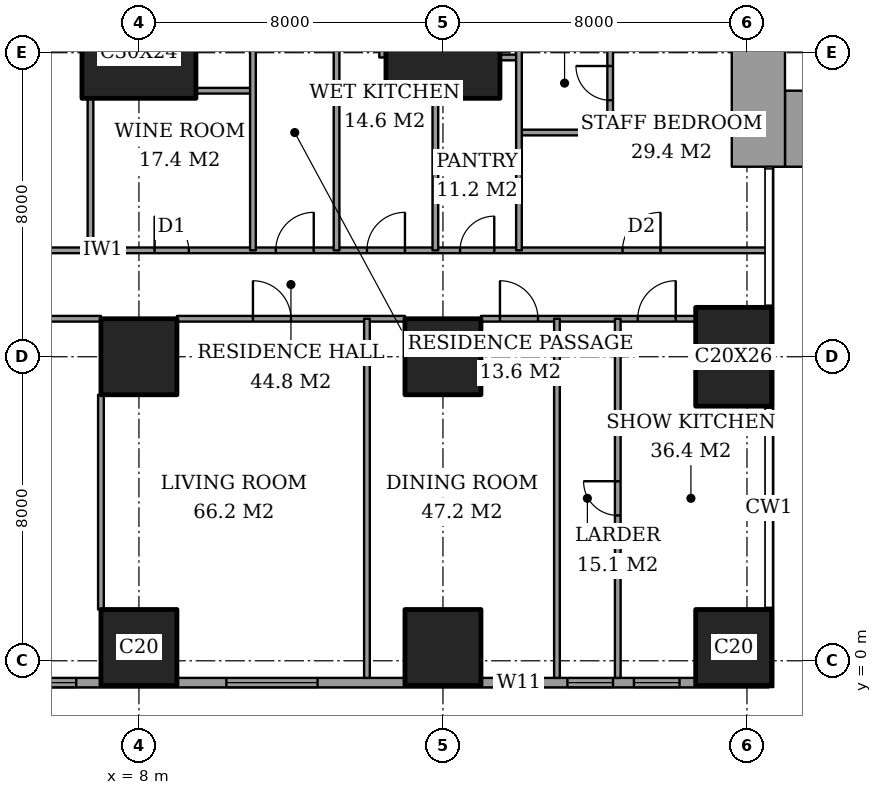
"""IFC4 building model, lengths in metres.
Left out: names, types, materials, properties, quantities, classifications, styles, units other than length and angle.
Written with IfcOpenShell. Run it as: python <this file> out.ifc"""

import sys

from ifc_helpers import new_model, si_unit, direction, frame, frame_2d, origin, origin_2d, place, context, subcontext, project, spatial, rectangle, extrude, element, fill, save


model = new_model("IFC4")
c1 = context("Model", 3, precision=1e-05, world=origin(), true_north=direction((0.0, 1.0)))
c2 = subcontext(c1, "Body", "Model", "MODEL_VIEW")
j1 = project(units=[si_unit("LENGTHUNIT", "METRE"), si_unit("PLANEANGLEUNIT", "RADIAN")], contexts=[c1])
p1 = place(None, origin())
s1 = spatial("IfcSite", under=j1, at=p1, CompositionType="ELEMENT")
p2 = place(p1, origin())
s2 = spatial("IfcBuilding", under=s1, at=p2, CompositionType="ELEMENT")
p3 = place(p2, frame((0.0, 0.0, 96.2)))
s3 = spatial("IfcBuildingStorey", under=s2, at=p3, CompositionType="ELEMENT", Elevation=96.2)
for number, where, z_axis, x_axis in (
    (1, (8.0, 0.35, 0.0), (0.0, 0.0, 1.0), (1.0, 0.0, 0.0)),
    (2, (8.0, 8.0, 0.0), (0.0, 0.0, 1.0), (1.0, 0.0, 0.0)),
):
    element("IfcColumn", number, at=place(p3, frame(where, z_axis=z_axis, x_axis=x_axis)), inside=s3, PredefinedType="COLUMN", context=c2, shape_type="SweptSolid", body=[
        extrude(rectangle(XDim=2.0, YDim=2.0, at=origin_2d()), origin(), (0.0, 0.0, 1.0), 3.6),
    ])
p4 = place(p3, frame((8.0, 16.0, 0.0), z_axis=(0.0, 0.0, 1.0), x_axis=(1.0, 0.0, 0.0)))
e3 = element("IfcColumn", 3, at=p4, inside=s3, PredefinedType="COLUMN", context=c2, shape_type="SweptSolid", body=[
    extrude(rectangle(XDim=3.0, YDim=2.4, at=origin_2d()), origin(), (0.0, 0.0, 1.0), 3.6),
])
for number, where, z_axis, x_axis in (
    (4, (16.0, 0.35, 0.0), (0.0, 0.0, 1.0), (1.0, 0.0, 0.0)),
    (5, (16.0, 8.0, 0.0), (0.0, 0.0, 1.0), (1.0, 0.0, 0.0)),
):
    element("IfcColumn", number, at=place(p3, frame(where, z_axis=z_axis, x_axis=x_axis)), inside=s3, PredefinedType="COLUMN", context=c2, shape_type="SweptSolid", body=[
        extrude(rectangle(XDim=2.0, YDim=2.0, at=origin_2d()), origin(), (0.0, 0.0, 1.0), 3.6),
    ])
p5 = place(p3, frame((16.0, 16.0, 0.0), z_axis=(0.0, 0.0, 1.0), x_axis=(1.0, 0.0, 0.0)))
e6 = element("IfcColumn", 6, at=p5, inside=s3, PredefinedType="COLUMN", context=c2, shape_type="SweptSolid", body=[
    extrude(rectangle(XDim=3.0, YDim=2.4, at=origin_2d()), origin(), (0.0, 0.0, 1.0), 3.6),
])
p6 = place(p3, frame((23.65, 0.35, 0.0), z_axis=(0.0, 0.0, 1.0), x_axis=(1.0, 0.0, 0.0)))
e7 = element("IfcColumn", 7, at=p6, inside=s3, PredefinedType="COLUMN", context=c2, shape_type="SweptSolid", body=[
    extrude(rectangle(XDim=2.0, YDim=2.0, at=origin_2d()), origin(), (0.0, 0.0, 1.0), 3.6),
])
p7 = place(p3, frame((23.65, 8.0, 0.0), z_axis=(0.0, 0.0, 1.0), x_axis=(1.0, 0.0, 0.0)))
e8 = element("IfcColumn", 8, at=p7, inside=s3, PredefinedType="COLUMN", context=c2, shape_type="SweptSolid", body=[
    extrude(rectangle(XDim=2.0, YDim=2.6, at=origin_2d()), origin(), (0.0, 0.0, 1.0), 3.6),
])
p8 = place(p3, frame((25.0, 14.0, 0.0), z_axis=(0.0, 0.0, 1.0), x_axis=(1.0, 0.0, 0.0)))
e9 = element("IfcWall", 9, at=p8, inside=s3, PredefinedType="SHEAR", context=c2, shape_type="SweptSolid", body=[
    extrude(rectangle(XDim=3.15, YDim=2.0, at=frame_2d((1.575, 0.0))), origin(), (0.0, 0.0, 1.0), 3.6),
])
p9 = place(p3, frame((24.3, 13.0, 0.0), z_axis=(0.0, 0.0, 1.0), x_axis=(0.0, 1.0, 0.0)))
e10 = element("IfcWall", 10, at=p9, inside=s3, PredefinedType="SHEAR", context=c2, shape_type="SweptSolid", body=[
    extrude(rectangle(XDim=10.15, YDim=1.4, at=frame_2d((5.075, 0.0))), origin(), (0.0, 0.0, 1.0), 3.6),
])
p10 = place(p3, frame((3.175, -0.575, 0.0), z_axis=(0.0, 0.0, 1.0), x_axis=(1.0, 0.0, 0.0)))
e11 = element("IfcWall", 11, at=p10, inside=s3, PredefinedType="SOLIDWALL", context=c2, shape_type="SweptSolid", body=[
    extrude(rectangle(XDim=21.4, YDim=0.25, at=frame_2d((10.7, 0.0))), origin(), (0.0, 0.0, 1.0), 3.6),
])
p11 = place(p10, frame((0.775, 0.0, 0.4)))
e12 = element("IfcOpeningElement", 12, at=p11, cuts=e11, PredefinedType="OPENING", context=c2, shape_type="SweptSolid", body=[
    extrude(rectangle(XDim=2.4, YDim=2.2, at=frame_2d((1.2, 1.1))), frame((0.0, 0.135, 0.0), z_axis=(0.0, -1.0, 0.0), x_axis=(1.0, 0.0, 0.0)), (0.0, 0.0, 1.0), 0.27),
])
p12 = place(p10, frame((7.125, 0.0, 0.4)))
e13 = element("IfcOpeningElement", 13, at=p12, cuts=e11, PredefinedType="OPENING", context=c2, shape_type="SweptSolid", body=[
    extrude(rectangle(XDim=2.4, YDim=2.2, at=frame_2d((1.2, 1.1))), frame((0.0, 0.135, 0.0), z_axis=(0.0, -1.0, 0.0), x_axis=(1.0, 0.0, 0.0)), (0.0, 0.0, 1.0), 0.27),
])
p13 = place(p10, frame((14.225, 0.0, 0.4)))
e14 = element("IfcOpeningElement", 14, at=p13, cuts=e11, PredefinedType="OPENING", context=c2, shape_type="SweptSolid", body=[
    extrude(rectangle(XDim=1.2, YDim=2.2, at=frame_2d((0.6, 1.1))), frame((0.0, 0.135, 0.0), z_axis=(0.0, -1.0, 0.0), x_axis=(1.0, 0.0, 0.0)), (0.0, 0.0, 1.0), 0.27),
])
p14 = place(p10, frame((16.1, 0.0, 0.4)))
e15 = element("IfcOpeningElement", 15, at=p14, cuts=e11, PredefinedType="OPENING", context=c2, shape_type="SweptSolid", body=[
    extrude(rectangle(XDim=1.2, YDim=2.2, at=frame_2d((0.6, 1.1))), frame((0.0, 0.135, 0.0), z_axis=(0.0, -1.0, 0.0), x_axis=(1.0, 0.0, 0.0)), (0.0, 0.0, 1.0), 0.27),
])
p15 = place(p10, frame((17.85, 0.0, 0.4)))
e16 = element("IfcOpeningElement", 16, at=p15, cuts=e11, PredefinedType="OPENING", context=c2, shape_type="SweptSolid", body=[
    extrude(rectangle(XDim=1.2, YDim=2.2, at=frame_2d((0.6, 1.1))), frame((0.0, 0.135, 0.0), z_axis=(0.0, -1.0, 0.0), x_axis=(1.0, 0.0, 0.0)), (0.0, 0.0, 1.0), 0.27),
])
p16 = place(p3, frame((1.35, 9.0, 0.0), z_axis=(0.0, 0.0, 1.0), x_axis=(1.0, 0.0, 0.0)))
e17 = element("IfcWall", 17, at=p16, inside=s3, PredefinedType="PARTITIONING", context=c2, shape_type="SweptSolid", body=[
    extrude(rectangle(XDim=5.65, YDim=0.15, at=frame_2d((2.825, 0.0))), origin(), (0.0, 0.0, 1.0), 3.35),
])
p17 = place(p16, frame((2.325, 0.0, 0.0)))
e18 = element("IfcOpeningElement", 18, at=p17, cuts=e17, PredefinedType="OPENING", context=c2, shape_type="SweptSolid", body=[
    extrude(rectangle(XDim=1.0, YDim=2.1, at=frame_2d((0.5, 1.05))), frame((0.0, 0.085, 0.0), z_axis=(0.0, -1.0, 0.0), x_axis=(1.0, 0.0, 0.0)), (0.0, 0.0, 1.0), 0.17),
])
p18 = place(p3, frame((9.0, 9.0, 0.0), z_axis=(0.0, 0.0, 1.0), x_axis=(1.0, 0.0, 0.0)))
e19 = element("IfcWall", 19, at=p18, inside=s3, PredefinedType="PARTITIONING", context=c2, shape_type="SweptSolid", body=[
    extrude(rectangle(XDim=6.0, YDim=0.15, at=frame_2d((3.0, 0.0))), origin(), (0.0, 0.0, 1.0), 3.35),
])
p19 = place(p18, frame((2.0, 0.0, 0.0)))
e20 = element("IfcOpeningElement", 20, at=p19, cuts=e19, PredefinedType="OPENING", context=c2, shape_type="SweptSolid", body=[
    extrude(rectangle(XDim=1.0, YDim=2.1, at=frame_2d((0.5, 1.05))), frame((0.0, 0.085, 0.0), z_axis=(0.0, -1.0, 0.0), x_axis=(1.0, 0.0, 0.0)), (0.0, 0.0, 1.0), 0.17),
])
p20 = place(p3, frame((17.0, 9.0, 0.0), z_axis=(0.0, 0.0, 1.0), x_axis=(1.0, 0.0, 0.0)))
e21 = element("IfcWall", 21, at=p20, inside=s3, PredefinedType="PARTITIONING", context=c2, shape_type="SweptSolid", body=[
    extrude(rectangle(XDim=5.65, YDim=0.15, at=frame_2d((2.825, 0.0))), origin(), (0.0, 0.0, 1.0), 3.35),
])
p21 = place(p20, frame((0.5, 0.0, 0.0)))
e22 = element("IfcOpeningElement", 22, at=p21, cuts=e21, PredefinedType="OPENING", context=c2, shape_type="SweptSolid", body=[
    extrude(rectangle(XDim=1.0, YDim=2.1, at=frame_2d((0.5, 1.05))), frame((0.0, 0.085, 0.0), z_axis=(0.0, -1.0, 0.0), x_axis=(1.0, 0.0, 0.0)), (0.0, 0.0, 1.0), 0.17),
])
p22 = place(p20, frame((4.125, 0.0, 0.0)))
e23 = element("IfcOpeningElement", 23, at=p22, cuts=e21, PredefinedType="OPENING", context=c2, shape_type="SweptSolid", body=[
    extrude(rectangle(XDim=1.0, YDim=2.1, at=frame_2d((0.5, 1.05))), frame((0.0, 0.085, 0.0), z_axis=(0.0, -1.0, 0.0), x_axis=(1.0, 0.0, 0.0)), (0.0, 0.0, 1.0), 0.17),
])
p23 = place(p3, frame((-0.45, 10.8, 0.0), z_axis=(0.0, 0.0, 1.0), x_axis=(1.0, 0.0, 0.0)))
e24 = element("IfcWall", 24, at=p23, inside=s3, PredefinedType="PARTITIONING", context=c2, shape_type="SweptSolid", body=[
    extrude(rectangle(XDim=25.011, YDim=0.15, at=frame_2d((12.505, 0.0))), origin(), (0.0, 0.0, 1.0), 3.35),
])
p24 = place(p23, frame((12.05, 0.0, 0.0)))
e25 = element("IfcOpeningElement", 25, at=p24, cuts=e24, PredefinedType="OPENING", context=c2, shape_type="SweptSolid", body=[
    extrude(rectangle(XDim=1.0, YDim=2.1, at=frame_2d((0.5, 1.05))), frame((0.0, 0.085, 0.0), z_axis=(0.0, -1.0, 0.0), x_axis=(1.0, 0.0, 0.0)), (0.0, 0.0, 1.0), 0.17),
])
p25 = place(p23, frame((3.087, 0.0, 0.0)))
e26 = element("IfcOpeningElement", 26, at=p25, cuts=e24, PredefinedType="OPENING", context=c2, shape_type="SweptSolid", body=[
    extrude(rectangle(XDim=1.0, YDim=2.1, at=frame_2d((0.5, 1.05))), frame((0.0, 0.085, 0.0), z_axis=(0.0, -1.0, 0.0), x_axis=(1.0, 0.0, 0.0)), (0.0, 0.0, 1.0), 0.17),
])
p26 = place(p23, frame((8.863, 0.0, 0.0)))
e27 = element("IfcOpeningElement", 27, at=p26, cuts=e24, PredefinedType="OPENING", context=c2, shape_type="SweptSolid", body=[
    extrude(rectangle(XDim=0.9, YDim=2.1, at=frame_2d((0.45, 1.05))), frame((0.0, 0.085, 0.0), z_axis=(0.0, -1.0, 0.0), x_axis=(1.0, 0.0, 0.0)), (0.0, 0.0, 1.0), 0.17),
])
p27 = place(p23, frame((14.45, 0.0, 0.0)))
e28 = element("IfcOpeningElement", 28, at=p27, cuts=e24, PredefinedType="OPENING", context=c2, shape_type="SweptSolid", body=[
    extrude(rectangle(XDim=1.0, YDim=2.1, at=frame_2d((0.5, 1.05))), frame((0.0, 0.085, 0.0), z_axis=(0.0, -1.0, 0.0), x_axis=(1.0, 0.0, 0.0)), (0.0, 0.0, 1.0), 0.17),
])
p28 = place(p23, frame((16.9, 0.0, 0.0)))
e29 = element("IfcOpeningElement", 29, at=p28, cuts=e24, PredefinedType="OPENING", context=c2, shape_type="SweptSolid", body=[
    extrude(rectangle(XDim=0.9, YDim=2.1, at=frame_2d((0.45, 1.05))), frame((0.0, 0.085, 0.0), z_axis=(0.0, -1.0, 0.0), x_axis=(1.0, 0.0, 0.0)), (0.0, 0.0, 1.0), 0.17),
])
p29 = place(p23, frame((21.175, 0.0, 0.0)))
e30 = element("IfcOpeningElement", 30, at=p29, cuts=e24, PredefinedType="OPENING", context=c2, shape_type="SweptSolid", body=[
    extrude(rectangle(XDim=1.0, YDim=2.1, at=frame_2d((0.5, 1.05))), frame((0.0, 0.085, 0.0), z_axis=(0.0, -1.0, 0.0), x_axis=(1.0, 0.0, 0.0)), (0.0, 0.0, 1.0), 0.17),
])
p30 = place(p3, frame((18.0, 13.9, 0.0), z_axis=(0.0, 0.0, 1.0), x_axis=(1.0, 0.0, 0.0)))
e31 = element("IfcWall", 31, at=p30, inside=s3, PredefinedType="PARTITIONING", context=c2, shape_type="SweptSolid", body=[
    extrude(rectangle(XDim=2.4, YDim=0.15, at=frame_2d((1.2, 0.0))), origin(), (0.0, 0.0, 1.0), 3.35),
])
p31 = place(p3, frame((9.5, 15.0, 0.0), z_axis=(0.0, 0.0, 1.0), x_axis=(1.0, 0.0, 0.0)))
e32 = element("IfcWall", 32, at=p31, inside=s3, PredefinedType="PARTITIONING", context=c2, shape_type="SweptSolid", body=[
    extrude(rectangle(XDim=1.5, YDim=0.15, at=frame_2d((0.75, 0.0))), origin(), (0.0, 0.0, 1.0), 3.35),
])
p32 = place(p3, frame((17.5, 15.875, 0.0), z_axis=(0.0, 0.0, 1.0), x_axis=(1.0, 0.0, 0.0)))
e33 = element("IfcWall", 33, at=p32, inside=s3, PredefinedType="PARTITIONING", context=c2, shape_type="SweptSolid", body=[
    extrude(rectangle(XDim=0.5, YDim=0.15, at=frame_2d((0.25, 0.0))), origin(), (0.0, 0.0, 1.0), 2.634),
])
p33 = place(p3, frame((6.725, 10.8, 0.0), z_axis=(0.0, 0.0, 1.0), x_axis=(0.0, 1.0, 0.0)))
e34 = element("IfcWall", 34, at=p33, inside=s3, PredefinedType="PARTITIONING", context=c2, shape_type="SweptSolid", body=[
    extrude(rectangle(XDim=4.0, YDim=0.15, at=frame_2d((2.0, 0.0))), origin(), (0.0, 0.0, 1.0), 3.35),
])
p34 = place(p3, frame((7.0, 1.35, 0.0), z_axis=(0.0, 0.0, 1.0), x_axis=(0.0, 1.0, 0.0)))
e35 = element("IfcWall", 35, at=p34, inside=s3, PredefinedType="PARTITIONING", context=c2, shape_type="SweptSolid", body=[
    extrude(rectangle(XDim=5.65, YDim=0.15, at=frame_2d((2.825, 0.0))), origin(), (0.0, 0.0, 1.0), 3.35),
])
p35 = place(p3, frame((11.0, 10.8, 0.0), z_axis=(0.0, 0.0, 1.0), x_axis=(0.0, 1.0, 0.0)))
e36 = element("IfcWall", 36, at=p35, inside=s3, PredefinedType="PARTITIONING", context=c2, shape_type="SweptSolid", body=[
    extrude(rectangle(XDim=10.8, YDim=0.15, at=frame_2d((5.4, 0.0))), origin(), (0.0, 0.0, 1.0), 3.35),
])
p36 = place(p35, frame((8.0, 0.0, 0.0)))
e37 = element("IfcOpeningElement", 37, at=p36, cuts=e36, PredefinedType="OPENING", context=c2, shape_type="SweptSolid", body=[
    extrude(rectangle(XDim=1.0, YDim=2.1, at=frame_2d((0.5, 1.05))), frame((0.0, 0.085, 0.0), z_axis=(0.0, -1.0, 0.0), x_axis=(1.0, 0.0, 0.0)), (0.0, 0.0, 1.0), 0.17),
])
p37 = place(p3, frame((13.2, 10.8, 0.0), z_axis=(0.0, 0.0, 1.0), x_axis=(0.0, 1.0, 0.0)))
e38 = element("IfcWall", 38, at=p37, inside=s3, PredefinedType="PARTITIONING", context=c2, shape_type="SweptSolid", body=[
    extrude(rectangle(XDim=6.2, YDim=0.15, at=frame_2d((3.1, 0.0))), origin(), (0.0, 0.0, 1.0), 3.35),
])
p38 = place(p3, frame((14.0, -0.45, 0.0), z_axis=(0.0, 0.0, 1.0), x_axis=(0.0, 1.0, 0.0)))
e39 = element("IfcWall", 39, at=p38, inside=s3, PredefinedType="PARTITIONING", context=c2, shape_type="SweptSolid", body=[
    extrude(rectangle(XDim=9.45, YDim=0.15, at=frame_2d((4.725, 0.0))), origin(), (0.0, 0.0, 1.0), 3.35),
])
p39 = place(p3, frame((14.4, 15.875, 0.0), z_axis=(0.0, 0.0, 1.0), x_axis=(0.0, 1.0, 0.0)))
e40 = element("IfcWall", 40, at=p39, inside=s3, PredefinedType="PARTITIONING", context=c2, shape_type="SweptSolid", body=[
    extrude(rectangle(XDim=1.125, YDim=0.15, at=frame_2d((0.562, 0.0))), origin(), (0.0, 0.0, 1.0), 3.35),
])
p40 = place(p3, frame((15.8, 10.8, 0.0), z_axis=(0.0, 0.0, 1.0), x_axis=(0.0, 1.0, 0.0)))
e41 = element("IfcWall", 41, at=p40, inside=s3, PredefinedType="PARTITIONING", context=c2, shape_type="SweptSolid", body=[
    extrude(rectangle(XDim=4.0, YDim=0.15, at=frame_2d((2.0, 0.0))), origin(), (0.0, 0.0, 1.0), 3.35),
])
p41 = place(p3, frame((18.0, 10.8, 0.0), z_axis=(0.0, 0.0, 1.0), x_axis=(0.0, 1.0, 0.0)))
e42 = element("IfcWall", 42, at=p41, inside=s3, PredefinedType="PARTITIONING", context=c2, shape_type="SweptSolid", body=[
    extrude(rectangle(XDim=6.2, YDim=0.15, at=frame_2d((3.1, 0.0))), origin(), (0.0, 0.0, 1.0), 3.35),
])
p42 = place(p3, frame((19.0, -0.45, 0.0), z_axis=(0.0, 0.0, 1.0), x_axis=(0.0, 1.0, 0.0)))
e43 = element("IfcWall", 43, at=p42, inside=s3, PredefinedType="PARTITIONING", context=c2, shape_type="SweptSolid", body=[
    extrude(rectangle(XDim=9.45, YDim=0.15, at=frame_2d((4.725, 0.0))), origin(), (0.0, 0.0, 1.0), 3.35),
])
p43 = place(p3, frame((20.4, 13.9, 0.0), z_axis=(0.0, 0.0, 1.0), x_axis=(0.0, 1.0, 0.0)))
e44 = element("IfcWall", 44, at=p43, inside=s3, PredefinedType="PARTITIONING", context=c2, shape_type="SweptSolid", body=[
    extrude(rectangle(XDim=2.6, YDim=0.15, at=frame_2d((1.3, 0.0))), origin(), (0.0, 0.0, 1.0), 3.35),
])
p44 = place(p43, frame((0.85, 0.0, 0.0)))
e45 = element("IfcOpeningElement", 45, at=p44, cuts=e44, PredefinedType="OPENING", context=c2, shape_type="SweptSolid", body=[
    extrude(rectangle(XDim=0.9, YDim=2.1, at=frame_2d((0.45, 1.05))), frame((0.0, 0.085, 0.0), z_axis=(0.0, -1.0, 0.0), x_axis=(1.0, 0.0, 0.0)), (0.0, 0.0, 1.0), 0.17),
])
p45 = place(p3, frame((20.6, -0.45, 0.0), z_axis=(0.0, 0.0, 1.0), x_axis=(0.0, 1.0, 0.0)))
e46 = element("IfcWall", 46, at=p45, inside=s3, PredefinedType="PARTITIONING", context=c2, shape_type="SweptSolid", body=[
    extrude(rectangle(XDim=9.45, YDim=0.15, at=frame_2d((4.725, 0.0))), origin(), (0.0, 0.0, 1.0), 3.35),
])
p46 = place(p45, frame((4.275, 0.0, 0.0)))
e47 = element("IfcOpeningElement", 47, at=p46, cuts=e46, PredefinedType="OPENING", context=c2, shape_type="SweptSolid", body=[
    extrude(rectangle(XDim=0.9, YDim=2.1, at=frame_2d((0.45, 1.05))), frame((0.0, 0.085, 0.0), z_axis=(0.0, -1.0, 0.0), x_axis=(1.0, 0.0, 0.0)), (0.0, 0.0, 1.0), 0.17),
])
p47 = place(p11, origin())
e48 = element("IfcWindow", 48, at=p47, inside=s3, PartitioningType="SINGLE_PANEL", PredefinedType="WINDOW", context=c2, shape_type="SweptSolid", body=[
    extrude(rectangle(XDim=2.4, YDim=2.2, at=frame_2d((1.2, 1.1))), frame((0.0, 0.03, 0.0), z_axis=(0.0, -1.0, 0.0), x_axis=(1.0, 0.0, 0.0)), (0.0, 0.0, 1.0), 0.06),
])
fill(e12, e48)
p48 = place(p12, origin())
e49 = element("IfcWindow", 49, at=p48, inside=s3, PartitioningType="SINGLE_PANEL", PredefinedType="WINDOW", context=c2, shape_type="SweptSolid", body=[
    extrude(rectangle(XDim=2.4, YDim=2.2, at=frame_2d((1.2, 1.1))), frame((0.0, 0.03, 0.0), z_axis=(0.0, -1.0, 0.0), x_axis=(1.0, 0.0, 0.0)), (0.0, 0.0, 1.0), 0.06),
])
fill(e13, e49)
p49 = place(p13, origin())
e50 = element("IfcWindow", 50, at=p49, inside=s3, PartitioningType="SINGLE_PANEL", PredefinedType="WINDOW", context=c2, shape_type="SweptSolid", body=[
    extrude(rectangle(XDim=1.2, YDim=2.2, at=frame_2d((0.6, 1.1))), frame((0.0, 0.03, 0.0), z_axis=(0.0, -1.0, 0.0), x_axis=(1.0, 0.0, 0.0)), (0.0, 0.0, 1.0), 0.06),
])
fill(e14, e50)
p50 = place(p14, origin())
e51 = element("IfcWindow", 51, at=p50, inside=s3, PartitioningType="SINGLE_PANEL", PredefinedType="WINDOW", context=c2, shape_type="SweptSolid", body=[
    extrude(rectangle(XDim=1.2, YDim=2.2, at=frame_2d((0.6, 1.1))), frame((0.0, 0.03, 0.0), z_axis=(0.0, -1.0, 0.0), x_axis=(1.0, 0.0, 0.0)), (0.0, 0.0, 1.0), 0.06),
])
fill(e15, e51)
p51 = place(p15, origin())
e52 = element("IfcWindow", 52, at=p51, inside=s3, PartitioningType="SINGLE_PANEL", PredefinedType="WINDOW", context=c2, shape_type="SweptSolid", body=[
    extrude(rectangle(XDim=1.2, YDim=2.2, at=frame_2d((0.6, 1.1))), frame((0.0, 0.03, 0.0), z_axis=(0.0, -1.0, 0.0), x_axis=(1.0, 0.0, 0.0)), (0.0, 0.0, 1.0), 0.06),
])
fill(e16, e52)
p52 = place(p19, origin())
e53 = element("IfcDoor", 53, at=p52, inside=s3, OperationType="SINGLE_SWING_RIGHT", PredefinedType="DOOR", context=c2, shape_type="SweptSolid", body=[
    extrude(rectangle(XDim=1.0, YDim=2.1, at=frame_2d((0.5, 1.05))), frame((0.0, 0.025, 0.0), z_axis=(0.0, -1.0, 0.0), x_axis=(1.0, 0.0, 0.0)), (0.0, 0.0, 1.0), 0.05),
])
fill(e20, e53)
p53 = place(p21, origin())
e54 = element("IfcDoor", 54, at=p53, inside=s3, OperationType="SINGLE_SWING_RIGHT", PredefinedType="DOOR", context=c2, shape_type="SweptSolid", body=[
    extrude(rectangle(XDim=1.0, YDim=2.1, at=frame_2d((0.5, 1.05))), frame((0.0, 0.025, 0.0), z_axis=(0.0, -1.0, 0.0), x_axis=(1.0, 0.0, 0.0)), (0.0, 0.0, 1.0), 0.05),
])
fill(e22, e54)
p54 = place(p46, origin())
e55 = element("IfcDoor", 55, at=p54, inside=s3, OperationType="SINGLE_SWING_LEFT", PredefinedType="DOOR", context=c2, shape_type="SweptSolid", body=[
    extrude(rectangle(XDim=0.9, YDim=2.1, at=frame_2d((0.45, 1.05))), frame((0.0, 0.025, 0.0), z_axis=(0.0, -1.0, 0.0), x_axis=(1.0, 0.0, 0.0)), (0.0, 0.0, 1.0), 0.05),
])
fill(e47, e55)
p55 = place(p22, origin())
e56 = element("IfcDoor", 56, at=p55, inside=s3, OperationType="SINGLE_SWING_LEFT", PredefinedType="DOOR", context=c2, shape_type="SweptSolid", body=[
    extrude(rectangle(XDim=1.0, YDim=2.1, at=frame_2d((0.5, 1.05))), frame((0.0, 0.025, 0.0), z_axis=(0.0, -1.0, 0.0), x_axis=(1.0, 0.0, 0.0)), (0.0, 0.0, 1.0), 0.05),
])
fill(e23, e56)
p56 = place(p24, origin())
e57 = element("IfcDoor", 57, at=p56, inside=s3, OperationType="SINGLE_SWING_LEFT", PredefinedType="DOOR", context=c2, shape_type="SweptSolid", body=[
    extrude(rectangle(XDim=1.0, YDim=2.1, at=frame_2d((0.5, 1.05))), frame((0.0, 0.025, 0.0), z_axis=(0.0, -1.0, 0.0), x_axis=(1.0, 0.0, 0.0)), (0.0, 0.0, 1.0), 0.05),
])
fill(e25, e57)
p57 = place(p26, origin())
e58 = element("IfcDoor", 58, at=p57, inside=s3, OperationType="SINGLE_SWING_RIGHT", PredefinedType="DOOR", context=c2, shape_type="SweptSolid", body=[
    extrude(rectangle(XDim=0.9, YDim=2.1, at=frame_2d((0.45, 1.05))), frame((0.0, 0.025, 0.0), z_axis=(0.0, -1.0, 0.0), x_axis=(1.0, 0.0, 0.0)), (0.0, 0.0, 1.0), 0.05),
])
fill(e27, e58)
p58 = place(p27, origin())
e59 = element("IfcDoor", 59, at=p58, inside=s3, OperationType="SINGLE_SWING_LEFT", PredefinedType="DOOR", context=c2, shape_type="SweptSolid", body=[
    extrude(rectangle(XDim=1.0, YDim=2.1, at=frame_2d((0.5, 1.05))), frame((0.0, 0.025, 0.0), z_axis=(0.0, -1.0, 0.0), x_axis=(1.0, 0.0, 0.0)), (0.0, 0.0, 1.0), 0.05),
])
fill(e28, e59)
p59 = place(p28, origin())
e60 = element("IfcDoor", 60, at=p59, inside=s3, OperationType="SINGLE_SWING_LEFT", PredefinedType="DOOR", context=c2, shape_type="SweptSolid", body=[
    extrude(rectangle(XDim=0.9, YDim=2.1, at=frame_2d((0.45, 1.05))), frame((0.0, 0.025, 0.0), z_axis=(0.0, -1.0, 0.0), x_axis=(1.0, 0.0, 0.0)), (0.0, 0.0, 1.0), 0.05),
])
fill(e29, e60)
p60 = place(p44, origin())
e61 = element("IfcDoor", 61, at=p60, inside=s3, OperationType="SINGLE_SWING_LEFT", PredefinedType="DOOR", context=c2, shape_type="SweptSolid", body=[
    extrude(rectangle(XDim=0.9, YDim=2.1, at=frame_2d((0.45, 1.05))), frame((0.0, 0.025, 0.0), z_axis=(0.0, -1.0, 0.0), x_axis=(1.0, 0.0, 0.0)), (0.0, 0.0, 1.0), 0.05),
])
fill(e45, e61)
p61 = place(p29, origin())
e62 = element("IfcDoor", 62, at=p61, inside=s3, OperationType="SINGLE_SWING_LEFT", PredefinedType="DOOR", context=c2, shape_type="SweptSolid", body=[
    extrude(rectangle(XDim=1.0, YDim=2.1, at=frame_2d((0.5, 1.05))), frame((0.0, 0.025, 0.0), z_axis=(0.0, -1.0, 0.0), x_axis=(1.0, 0.0, 0.0)), (0.0, 0.0, 1.0), 0.05),
])
fill(e30, e62)
save(model, sys.argv[1])
